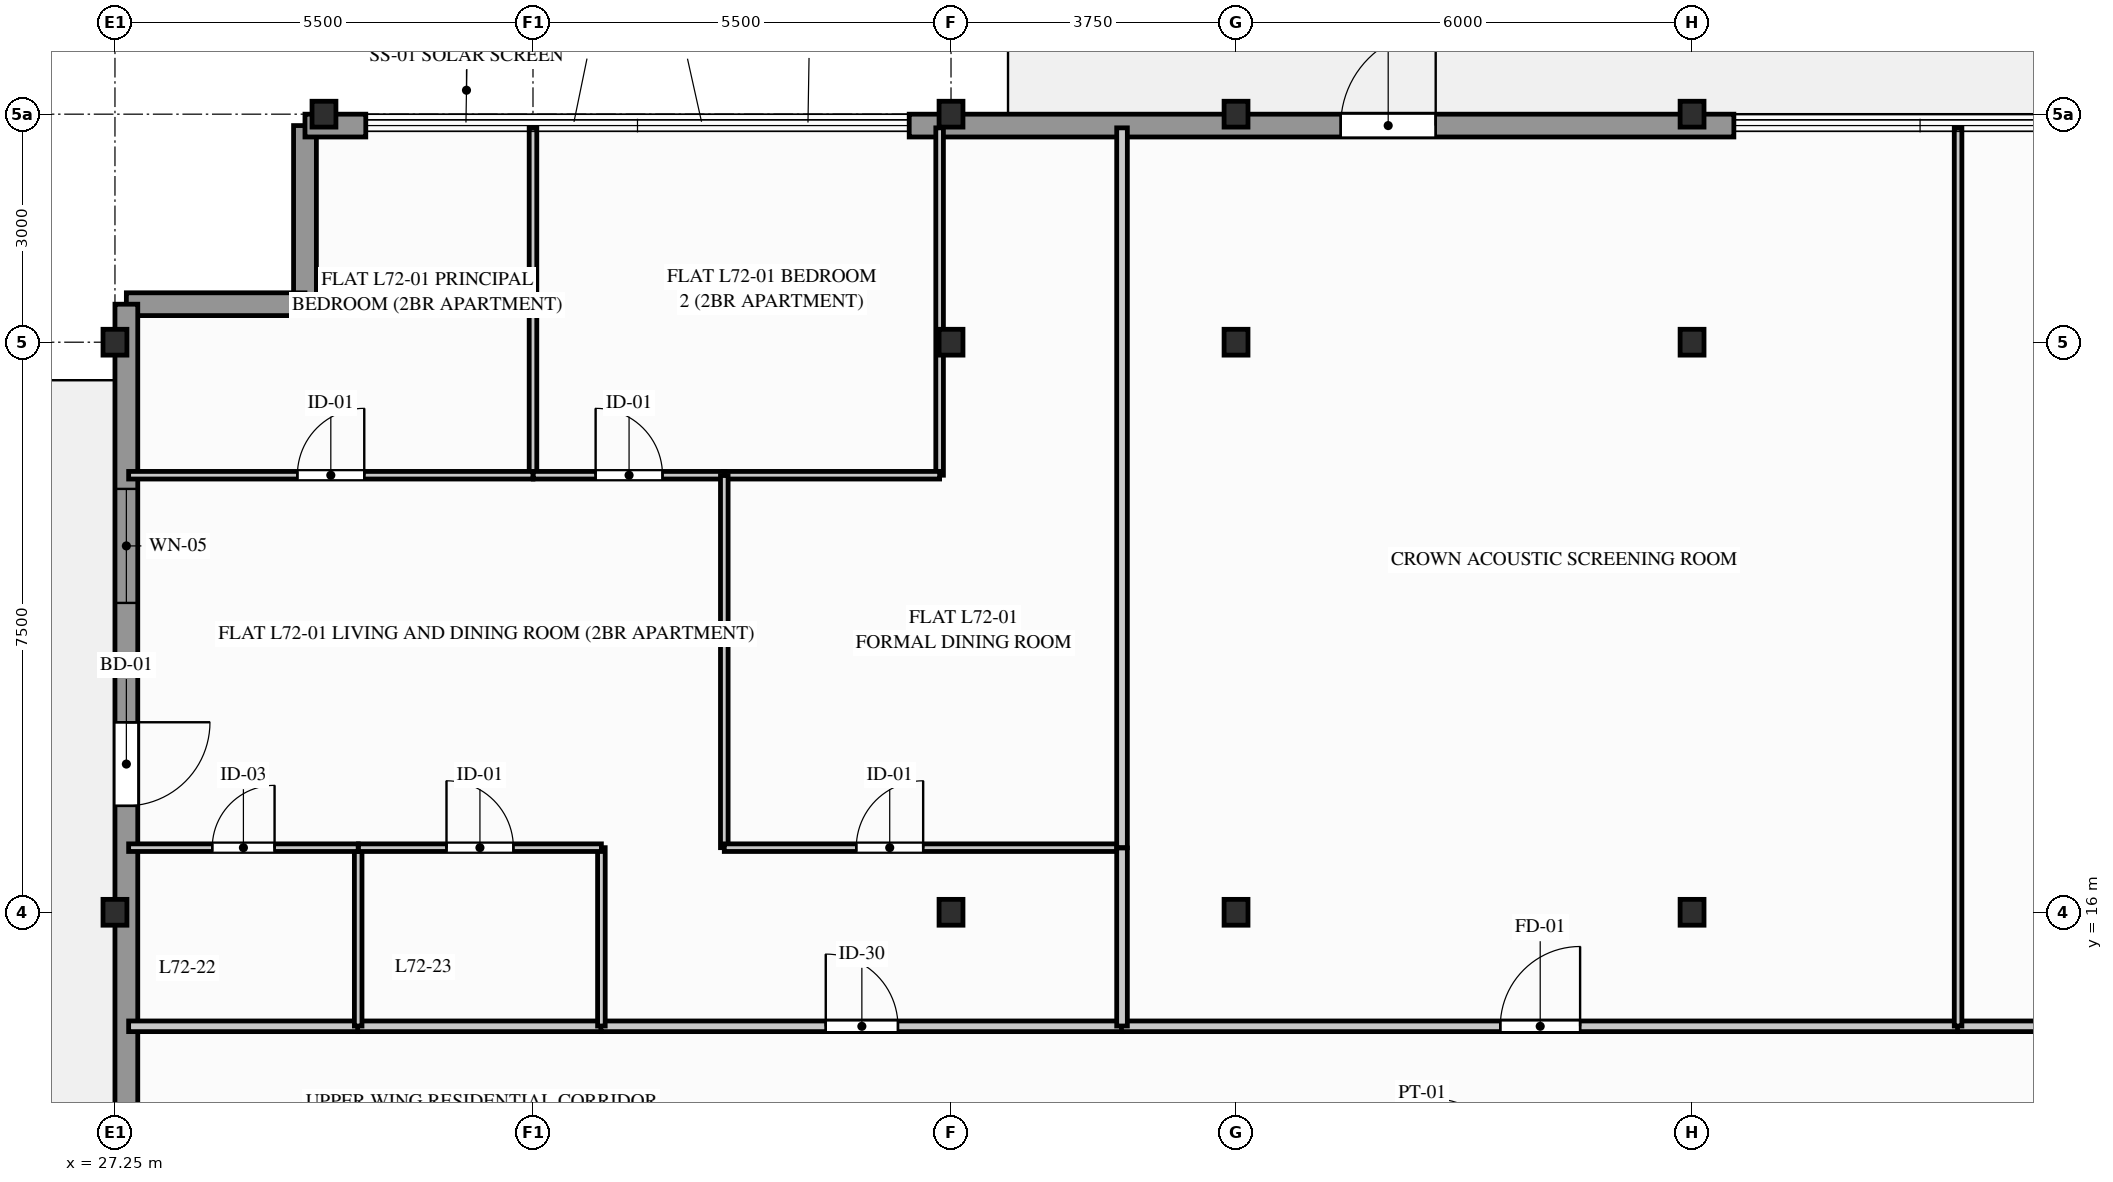
"""IFC4 building model, lengths in metres.
Left out: names, types, materials, properties, quantities, classifications, styles, units other than length and angle.
Written with IfcOpenShell. Run it as: python <this file> out.ifc"""

import sys

from ifc_helpers import new_model, si_unit, direction, frame, frame_2d, origin, origin_2d, place, context, subcontext, project, spatial, rectangle, i_section, extrude, element, fill, save


model = new_model("IFC4")
c1 = context("Model", 3, precision=1e-05, world=origin(), true_north=direction((0.0, 1.0)))
c2 = subcontext(c1, "Body", "Model", "MODEL_VIEW")
j1 = project(units=[si_unit("LENGTHUNIT", "METRE"), si_unit("PLANEANGLEUNIT", "RADIAN")], contexts=[c1])
p1 = place(None, origin())
s1 = spatial("IfcSite", under=j1, at=p1, CompositionType="ELEMENT")
p2 = place(p1, origin())
s2 = spatial("IfcBuilding", under=s1, at=p2, CompositionType="ELEMENT")
p3 = place(p2, frame((0.0, 0.0, 236.6)))
s3 = spatial("IfcBuildingStorey", under=s2, at=p3, CompositionType="ELEMENT", Elevation=236.6)
for number, where, z_axis, x_axis in (
    (1, (27.25, 16.0, 0.0), (0.0, 0.0, 1.0), (1.0, 0.0, 0.0)),
    (2, (27.25, 23.5, 0.0), (0.0, 0.0, 1.0), (1.0, 0.0, 0.0)),
    (3, (30.0, 26.5, 0.0), (0.0, 0.0, 1.0), (1.0, 0.0, 0.0)),
    (4, (38.25, 16.0, 0.0), (0.0, 0.0, 1.0), (1.0, 0.0, 0.0)),
    (5, (38.25, 23.5, 0.0), (0.0, 0.0, 1.0), (1.0, 0.0, 0.0)),
    (6, (38.25, 26.5, 0.0), (0.0, 0.0, 1.0), (1.0, 0.0, 0.0)),
    (7, (42.0, 16.0, 0.0), (0.0, 0.0, 1.0), (1.0, 0.0, 0.0)),
    (8, (42.0, 23.5, 0.0), (0.0, 0.0, 1.0), (1.0, 0.0, 0.0)),
    (9, (42.0, 26.5, 0.0), (0.0, 0.0, 1.0), (1.0, 0.0, 0.0)),
    (10, (48.0, 16.0, 0.0), (0.0, 0.0, 1.0), (1.0, 0.0, 0.0)),
    (11, (48.0, 23.5, 0.0), (0.0, 0.0, 1.0), (1.0, 0.0, 0.0)),
    (12, (48.0, 26.5, 0.0), (0.0, 0.0, 1.0), (1.0, 0.0, 0.0)),
):
    element("IfcColumn", number, at=place(p3, frame(where, z_axis=z_axis, x_axis=x_axis)), inside=s3, PredefinedType="COLUMN", context=c2, shape_type="SweptSolid", body=[
        extrude(i_section(OverallWidth=0.314, OverallDepth=0.34, WebThickness=0.019, FlangeThickness=0.031, FilletRadius=0.015, at=origin_2d()), origin(), (0.0, 0.0, 1.0), 3.45),
    ])
for number, where, z_axis, x_axis in (
    (13, (29.75, 26.35, 0.0), (0.0, 0.0, 1.0), (0.0, -1.0, 0.0)),
    (14, (29.75, 24.0, 0.0), (0.0, 0.0, 1.0), (-1.0, 0.0, 0.0)),
):
    element("IfcWall", number, at=place(p3, frame(where, z_axis=z_axis, x_axis=x_axis)), inside=s3, PredefinedType="STANDARD", context=c2, shape_type="SweptSolid", body=[
        extrude(rectangle(XDim=2.35, YDim=0.3, at=frame_2d((1.175, 0.0))), origin(), (0.0, 0.0, 1.0), 3.2),
    ])
p4 = place(p3, frame((29.75, 26.35, 0.0), z_axis=(0.0, 0.0, 1.0), x_axis=(1.0, 0.0, 0.0)))
e15 = element("IfcWall", 15, at=p4, inside=s3, PredefinedType="STANDARD", context=c2, shape_type="SweptSolid", body=[
    extrude(rectangle(XDim=0.8, YDim=0.3, at=frame_2d((0.4, 0.0))), origin(), (0.0, 0.0, 1.0), 3.2),
])
p5 = place(p3, frame((37.7, 26.35, 0.0), z_axis=(0.0, 0.0, 1.0), x_axis=(1.0, 0.0, 0.0)))
e16 = element("IfcWall", 16, at=p5, inside=s3, PredefinedType="STANDARD", context=c2, shape_type="SweptSolid", body=[
    extrude(rectangle(XDim=10.85, YDim=0.3, at=frame_2d((5.425, 0.0))), origin(), (0.0, 0.0, 1.0), 2.635),
])
p6 = place(p5, frame((5.677, 0.0, 0.0)))
e17 = element("IfcOpeningElement", 17, at=p6, cuts=e16, PredefinedType="OPENING", context=c2, shape_type="SweptSolid", body=[
    extrude(rectangle(XDim=1.25, YDim=2.2, at=frame_2d((0.625, 1.1))), frame((0.0, 0.16, 0.0), z_axis=(0.0, -1.0, 0.0), x_axis=(1.0, 0.0, 0.0)), (0.0, 0.0, 1.0), 0.32),
])
p7 = place(p3, frame((27.4, 24.0, 0.0), z_axis=(0.0, 0.0, 1.0), x_axis=(0.0, -1.0, 0.0)))
e18 = element("IfcWall", 18, at=p7, inside=s3, PredefinedType="STANDARD", context=c2, shape_type="SweptSolid", body=[
    extrude(rectangle(XDim=21.5, YDim=0.3, at=frame_2d((10.75, 0.0))), origin(), (0.0, 0.0, 1.0), 2.635),
])
p8 = place(p7, frame((5.5, 0.0, 0.0)))
e19 = element("IfcOpeningElement", 19, at=p8, cuts=e18, PredefinedType="OPENING", context=c2, shape_type="SweptSolid", body=[
    extrude(rectangle(XDim=1.1, YDim=2.2, at=frame_2d((0.55, 1.1))), frame((0.0, 0.16, 0.0), z_axis=(0.0, -1.0, 0.0), x_axis=(1.0, 0.0, 0.0)), (0.0, 0.0, 1.0), 0.32),
])
p9 = place(p7, frame((2.43, 0.0, 0.616)))
e20 = element("IfcOpeningElement", 20, at=p9, cuts=e18, PredefinedType="OPENING", context=c2, shape_type="SweptSolid", body=[
    extrude(rectangle(XDim=1.5, YDim=1.8, at=frame_2d((0.75, 0.9))), frame((0.0, 0.16, 0.0), z_axis=(0.0, -1.0, 0.0), x_axis=(1.0, 0.0, 0.0)), (0.0, 0.0, 1.0), 0.32),
])
p10 = place(p3, frame((27.43, 14.5, 0.0), z_axis=(0.0, 0.0, 1.0), x_axis=(1.0, 0.0, 0.0)))
e21 = element("IfcWall", 21, at=p10, inside=s3, PredefinedType="PARTITIONING", context=c2, shape_type="SweptSolid", body=[
    extrude(rectangle(XDim=3.031, YDim=0.14, at=frame_2d((1.516, 0.0))), origin(), (0.0, 0.0, 1.0), 3.2),
])
p11 = place(p3, frame((30.443, 14.5, 0.0), z_axis=(0.0, 0.0, 1.0), x_axis=(1.0, 0.0, 0.0)))
e22 = element("IfcWall", 22, at=p11, inside=s3, PredefinedType="PARTITIONING", context=c2, shape_type="SweptSolid", body=[
    extrude(rectangle(XDim=3.219, YDim=0.14, at=frame_2d((1.609, 0.0))), origin(), (0.0, 0.0, 1.0), 3.2),
])
p12 = place(p3, frame((33.643, 14.5, 0.0), z_axis=(0.0, 0.0, 1.0), x_axis=(1.0, 0.0, 0.0)))
e23 = element("IfcWall", 23, at=p12, inside=s3, PredefinedType="PARTITIONING", context=c2, shape_type="SweptSolid", body=[
    extrude(rectangle(XDim=6.869, YDim=0.14, at=frame_2d((3.434, 0.0))), origin(), (0.0, 0.0, 1.0), 2.563),
])
p13 = place(p12, frame((2.959, 0.0, 0.0)))
e24 = element("IfcOpeningElement", 24, at=p13, cuts=e23, PredefinedType="OPENING", context=c2, shape_type="SweptSolid", body=[
    extrude(rectangle(XDim=0.95, YDim=2.05, at=frame_2d((0.475, 1.025))), frame((0.0, 0.08, 0.0), z_axis=(0.0, -1.0, 0.0), x_axis=(1.0, 0.0, 0.0)), (0.0, 0.0, 1.0), 0.16),
])
p14 = place(p3, frame((40.493, 14.5, 0.0), z_axis=(0.0, 0.0, 1.0), x_axis=(1.0, 0.0, 0.0)))
e25 = element("IfcWall", 25, at=p14, inside=s3, PredefinedType="PARTITIONING", context=c2, shape_type="SweptSolid", body=[
    extrude(rectangle(XDim=11.019, YDim=0.14, at=frame_2d((5.509, 0.0))), origin(), (0.0, 0.0, 1.0), 2.563),
])
p15 = place(p14, frame((4.984, 0.0, 0.0)))
e26 = element("IfcOpeningElement", 26, at=p15, cuts=e25, PredefinedType="OPENING", context=c2, shape_type="SweptSolid", body=[
    extrude(rectangle(XDim=1.05, YDim=2.06, at=frame_2d((0.525, 1.03))), frame((0.0, 0.08, 0.0), z_axis=(0.0, -1.0, 0.0), x_axis=(1.0, 0.0, 0.0)), (0.0, 0.0, 1.0), 0.16),
])
p16 = place(p3, frame((51.493, 14.5, 0.0), z_axis=(0.0, 0.0, 1.0), x_axis=(1.0, 0.0, 0.0)))
e27 = element("IfcWall", 27, at=p16, inside=s3, PredefinedType="PARTITIONING", context=c2, shape_type="SweptSolid", body=[
    extrude(rectangle(XDim=8.327, YDim=0.14, at=frame_2d((4.164, 0.0))), origin(), (0.0, 0.0, 1.0), 2.563),
])
p17 = place(p16, frame((3.689, 0.0, 0.0)))
e28 = element("IfcOpeningElement", 28, at=p17, cuts=e27, PredefinedType="OPENING", context=c2, shape_type="SweptSolid", body=[
    extrude(rectangle(XDim=0.95, YDim=2.05, at=frame_2d((0.475, 1.025))), frame((0.0, 0.08, 0.0), z_axis=(0.0, -1.0, 0.0), x_axis=(1.0, 0.0, 0.0)), (0.0, 0.0, 1.0), 0.16),
])
p18 = place(p3, frame((30.45, 14.504, 0.0), z_axis=(0.0, 0.0, 1.0), x_axis=(0.0, 1.0, 0.0)))
e29 = element("IfcWall", 29, at=p18, inside=s3, PredefinedType="PARTITIONING", context=c2, shape_type="SweptSolid", body=[
    extrude(rectangle(XDim=2.346, YDim=0.1, at=frame_2d((1.173, 0.0))), origin(), (0.0, 0.0, 1.0), 2.139),
])
p19 = place(p3, frame((27.43, 16.85, 0.0), z_axis=(0.0, 0.0, 1.0), x_axis=(1.0, 0.0, 0.0)))
e30 = element("IfcWall", 30, at=p19, inside=s3, PredefinedType="PARTITIONING", context=c2, shape_type="SweptSolid", body=[
    extrude(rectangle(XDim=3.02, YDim=0.1, at=frame_2d((1.51, 0.0))), origin(), (0.0, 0.0, 1.0), 3.2),
])
p20 = place(p19, frame((1.1, 0.0, 0.0)))
e31 = element("IfcOpeningElement", 31, at=p20, cuts=e30, PredefinedType="OPENING", context=c2, shape_type="SweptSolid", body=[
    extrude(rectangle(XDim=0.82, YDim=2.02, at=frame_2d((0.41, 1.01))), frame((0.0, 0.06, 0.0), z_axis=(0.0, -1.0, 0.0), x_axis=(1.0, 0.0, 0.0)), (0.0, 0.0, 1.0), 0.12),
])
p21 = place(p3, frame((33.65, 14.504, 0.0), z_axis=(0.0, 0.0, 1.0), x_axis=(0.0, 1.0, 0.0)))
e32 = element("IfcWall", 32, at=p21, inside=s3, PredefinedType="PARTITIONING", context=c2, shape_type="SweptSolid", body=[
    extrude(rectangle(XDim=2.346, YDim=0.1, at=frame_2d((1.173, 0.0))), origin(), (0.0, 0.0, 1.0), 2.139),
])
p22 = place(p3, frame((30.454, 16.85, 0.0), z_axis=(0.0, 0.0, 1.0), x_axis=(1.0, 0.0, 0.0)))
e33 = element("IfcWall", 33, at=p22, inside=s3, PredefinedType="PARTITIONING", context=c2, shape_type="SweptSolid", body=[
    extrude(rectangle(XDim=3.196, YDim=0.1, at=frame_2d((1.598, 0.0))), origin(), (0.0, 0.0, 1.0), 3.2),
])
p23 = place(p22, frame((1.158, 0.0, 0.0)))
e34 = element("IfcOpeningElement", 34, at=p23, cuts=e33, PredefinedType="OPENING", context=c2, shape_type="SweptSolid", body=[
    extrude(rectangle(XDim=0.88, YDim=2.04, at=frame_2d((0.44, 1.02))), frame((0.0, 0.06, 0.0), z_axis=(0.0, -1.0, 0.0), x_axis=(1.0, 0.0, 0.0)), (0.0, 0.0, 1.0), 0.12),
])
p24 = place(p3, frame((32.75, 21.75, 0.0), z_axis=(0.0, 0.0, 1.0), x_axis=(0.0, 1.0, 0.0)))
e35 = element("IfcWall", 35, at=p24, inside=s3, PredefinedType="PARTITIONING", context=c2, shape_type="SweptSolid", body=[
    extrude(rectangle(XDim=4.57, YDim=0.1, at=frame_2d((2.285, 0.0))), origin(), (0.0, 0.0, 1.0), 2.139),
])
p25 = place(p3, frame((27.43, 21.75, 0.0), z_axis=(0.0, 0.0, 1.0), x_axis=(1.0, 0.0, 0.0)))
e36 = element("IfcWall", 36, at=p25, inside=s3, PredefinedType="PARTITIONING", context=c2, shape_type="SweptSolid", body=[
    extrude(rectangle(XDim=5.32, YDim=0.1, at=frame_2d((2.66, 0.0))), origin(), (0.0, 0.0, 1.0), 3.2),
])
p26 = place(p25, frame((2.22, 0.0, 0.0)))
e37 = element("IfcOpeningElement", 37, at=p26, cuts=e36, PredefinedType="OPENING", context=c2, shape_type="SweptSolid", body=[
    extrude(rectangle(XDim=0.88, YDim=2.04, at=frame_2d((0.44, 1.02))), frame((0.0, 0.06, 0.0), z_axis=(0.0, -1.0, 0.0), x_axis=(1.0, 0.0, 0.0)), (0.0, 0.0, 1.0), 0.12),
])
p27 = place(p3, frame((38.1, 21.75, 0.0), z_axis=(0.0, 0.0, 1.0), x_axis=(0.0, 1.0, 0.0)))
e38 = element("IfcWall", 38, at=p27, inside=s3, PredefinedType="PARTITIONING", context=c2, shape_type="SweptSolid", body=[
    extrude(rectangle(XDim=4.57, YDim=0.1, at=frame_2d((2.285, 0.0))), origin(), (0.0, 0.0, 1.0), 2.139),
])
p28 = place(p3, frame((35.256, 21.75, 0.0), z_axis=(0.0, 0.0, 1.0), x_axis=(1.0, 0.0, 0.0)))
e39 = element("IfcWall", 39, at=p28, inside=s3, PredefinedType="PARTITIONING", context=c2, shape_type="SweptSolid", body=[
    extrude(rectangle(XDim=2.844, YDim=0.1, at=frame_2d((1.422, 0.0))), origin(), (0.0, 0.0, 1.0), 3.2),
])
p29 = place(p3, frame((32.754, 21.75, 0.0), z_axis=(0.0, 0.0, 1.0), x_axis=(1.0, 0.0, 0.0)))
e40 = element("IfcWall", 40, at=p29, inside=s3, PredefinedType="PARTITIONING", context=c2, shape_type="SweptSolid", body=[
    extrude(rectangle(XDim=2.521, YDim=0.1, at=frame_2d((1.26, 0.0))), origin(), (0.0, 0.0, 1.0), 3.2),
])
p30 = place(p29, frame((0.82, 0.0, 0.0)))
e41 = element("IfcOpeningElement", 41, at=p30, cuts=e40, PredefinedType="OPENING", context=c2, shape_type="SweptSolid", body=[
    extrude(rectangle(XDim=0.88, YDim=2.04, at=frame_2d((0.44, 1.02))), frame((0.0, 0.06, 0.0), z_axis=(0.0, -1.0, 0.0), x_axis=(1.0, 0.0, 0.0)), (0.0, 0.0, 1.0), 0.12),
])
p31 = place(p3, frame((35.267, 16.85, 0.0), z_axis=(0.0, 0.0, 1.0), x_axis=(0.0, 1.0, 0.0)))
e42 = element("IfcWall", 42, at=p31, inside=s3, PredefinedType="PARTITIONING", context=c2, shape_type="SweptSolid", body=[
    extrude(rectangle(XDim=4.896, YDim=0.1, at=frame_2d((2.448, 0.0))), origin(), (0.0, 0.0, 1.0), 2.82),
])
p32 = place(p3, frame((35.267, 16.85, 0.0), z_axis=(0.0, 0.0, 1.0), x_axis=(1.0, 0.0, 0.0)))
e43 = element("IfcWall", 43, at=p32, inside=s3, PredefinedType="PARTITIONING", context=c2, shape_type="SweptSolid", body=[
    extrude(rectangle(XDim=5.233, YDim=0.1, at=frame_2d((2.616, 0.0))), origin(), (0.0, 0.0, 1.0), 2.563),
])
p33 = place(p32, frame((1.737, 0.0, 0.0)))
e44 = element("IfcOpeningElement", 44, at=p33, cuts=e43, PredefinedType="OPENING", context=c2, shape_type="SweptSolid", body=[
    extrude(rectangle(XDim=0.88, YDim=2.04, at=frame_2d((0.44, 1.02))), frame((0.0, 0.06, 0.0), z_axis=(0.0, -1.0, 0.0), x_axis=(1.0, 0.0, 0.0)), (0.0, 0.0, 1.0), 0.12),
])
p34 = place(p3, frame((40.5, 16.85, 0.0), z_axis=(0.0, 0.0, 1.0), x_axis=(0.0, 1.0, 0.0)))
e45 = element("IfcWall", 45, at=p34, inside=s3, PredefinedType="PARTITIONING", context=c2, shape_type="SweptSolid", body=[
    extrude(rectangle(XDim=9.47, YDim=0.14, at=frame_2d((4.735, 0.0))), origin(), (0.0, 0.0, 1.0), 2.139),
])
p35 = place(p3, frame((40.5, 14.504, 0.0), z_axis=(0.0, 0.0, 1.0), x_axis=(0.0, 1.0, 0.0)))
e46 = element("IfcWall", 46, at=p35, inside=s3, PredefinedType="PARTITIONING", context=c2, shape_type="SweptSolid", body=[
    extrude(rectangle(XDim=2.342, YDim=0.14, at=frame_2d((1.171, 0.0))), origin(), (0.0, 0.0, 1.0), 2.139),
])
p36 = place(p3, frame((51.5, 14.504, 0.0), z_axis=(0.0, 0.0, 1.0), x_axis=(0.0, 1.0, 0.0)))
e47 = element("IfcWall", 47, at=p36, inside=s3, PredefinedType="PARTITIONING", context=c2, shape_type="SweptSolid", body=[
    extrude(rectangle(XDim=11.816, YDim=0.1, at=frame_2d((5.908, 0.0))), origin(), (0.0, 0.0, 1.0), 2.563),
])
p37 = place(p6, origin())
e48 = element("IfcDoor", 48, at=p37, inside=s3, OperationType="SINGLE_SWING_RIGHT", PredefinedType="DOOR", context=c2, shape_type="SweptSolid", body=[
    extrude(rectangle(XDim=1.25, YDim=2.2, at=frame_2d((0.625, 1.1))), frame((0.0, 0.025, 0.0), z_axis=(0.0, -1.0, 0.0), x_axis=(1.0, 0.0, 0.0)), (0.0, 0.0, 1.0), 0.05),
])
fill(e17, e48)
p38 = place(p8, origin())
e49 = element("IfcDoor", 49, at=p38, inside=s3, OperationType="SINGLE_SWING_LEFT", PredefinedType="DOOR", context=c2, shape_type="SweptSolid", body=[
    extrude(rectangle(XDim=1.1, YDim=2.2, at=frame_2d((0.55, 1.1))), frame((0.0, 0.025, 0.0), z_axis=(0.0, -1.0, 0.0), x_axis=(1.0, 0.0, 0.0)), (0.0, 0.0, 1.0), 0.05),
])
fill(e19, e49)
p39 = place(p9, origin())
e50 = element("IfcWindow", 50, at=p39, inside=s3, PartitioningType="SINGLE_PANEL", PredefinedType="WINDOW", context=c2, shape_type="SweptSolid", body=[
    extrude(rectangle(XDim=1.5, YDim=1.8, at=frame_2d((0.75, 0.9))), frame((0.0, 0.03, 0.0), z_axis=(0.0, -1.0, 0.0), x_axis=(1.0, 0.0, 0.0)), (0.0, 0.0, 1.0), 0.06),
])
fill(e20, e50)
p40 = place(p13, origin())
e51 = element("IfcDoor", 51, at=p40, inside=s3, OperationType="SINGLE_SWING_LEFT", PredefinedType="DOOR", context=c2, shape_type="SweptSolid", body=[
    extrude(rectangle(XDim=0.95, YDim=2.05, at=frame_2d((0.475, 1.025))), frame((0.0, 0.025, 0.0), z_axis=(0.0, -1.0, 0.0), x_axis=(1.0, 0.0, 0.0)), (0.0, 0.0, 1.0), 0.05),
])
fill(e24, e51)
p41 = place(p15, origin())
e52 = element("IfcDoor", 52, at=p41, inside=s3, OperationType="SINGLE_SWING_RIGHT", PredefinedType="DOOR", context=c2, shape_type="SweptSolid", body=[
    extrude(rectangle(XDim=1.05, YDim=2.06, at=frame_2d((0.525, 1.03))), frame((0.0, 0.025, 0.0), z_axis=(0.0, -1.0, 0.0), x_axis=(1.0, 0.0, 0.0)), (0.0, 0.0, 1.0), 0.05),
])
fill(e26, e52)
p42 = place(p20, origin())
e53 = element("IfcDoor", 53, at=p42, inside=s3, OperationType="SINGLE_SWING_RIGHT", PredefinedType="DOOR", context=c2, shape_type="SweptSolid", body=[
    extrude(rectangle(XDim=0.82, YDim=2.02, at=frame_2d((0.41, 1.01))), frame((0.0, 0.025, 0.0), z_axis=(0.0, -1.0, 0.0), x_axis=(1.0, 0.0, 0.0)), (0.0, 0.0, 1.0), 0.05),
])
fill(e31, e53)
p43 = place(p23, origin())
e54 = element("IfcDoor", 54, at=p43, inside=s3, OperationType="SINGLE_SWING_LEFT", PredefinedType="DOOR", context=c2, shape_type="SweptSolid", body=[
    extrude(rectangle(XDim=0.88, YDim=2.04, at=frame_2d((0.44, 1.02))), frame((0.0, 0.025, 0.0), z_axis=(0.0, -1.0, 0.0), x_axis=(1.0, 0.0, 0.0)), (0.0, 0.0, 1.0), 0.05),
])
fill(e34, e54)
p44 = place(p26, origin())
e55 = element("IfcDoor", 55, at=p44, inside=s3, OperationType="SINGLE_SWING_RIGHT", PredefinedType="DOOR", context=c2, shape_type="SweptSolid", body=[
    extrude(rectangle(XDim=0.88, YDim=2.04, at=frame_2d((0.44, 1.02))), frame((0.0, 0.025, 0.0), z_axis=(0.0, -1.0, 0.0), x_axis=(1.0, 0.0, 0.0)), (0.0, 0.0, 1.0), 0.05),
])
fill(e37, e55)
p45 = place(p30, origin())
e56 = element("IfcDoor", 56, at=p45, inside=s3, OperationType="SINGLE_SWING_LEFT", PredefinedType="DOOR", context=c2, shape_type="SweptSolid", body=[
    extrude(rectangle(XDim=0.88, YDim=2.04, at=frame_2d((0.44, 1.02))), frame((0.0, 0.025, 0.0), z_axis=(0.0, -1.0, 0.0), x_axis=(1.0, 0.0, 0.0)), (0.0, 0.0, 1.0), 0.05),
])
fill(e41, e56)
p46 = place(p33, origin())
e57 = element("IfcDoor", 57, at=p46, inside=s3, OperationType="SINGLE_SWING_RIGHT", PredefinedType="DOOR", context=c2, shape_type="SweptSolid", body=[
    extrude(rectangle(XDim=0.88, YDim=2.04, at=frame_2d((0.44, 1.02))), frame((0.0, 0.025, 0.0), z_axis=(0.0, -1.0, 0.0), x_axis=(1.0, 0.0, 0.0)), (0.0, 0.0, 1.0), 0.05),
])
fill(e44, e57)
save(model, sys.argv[1])
